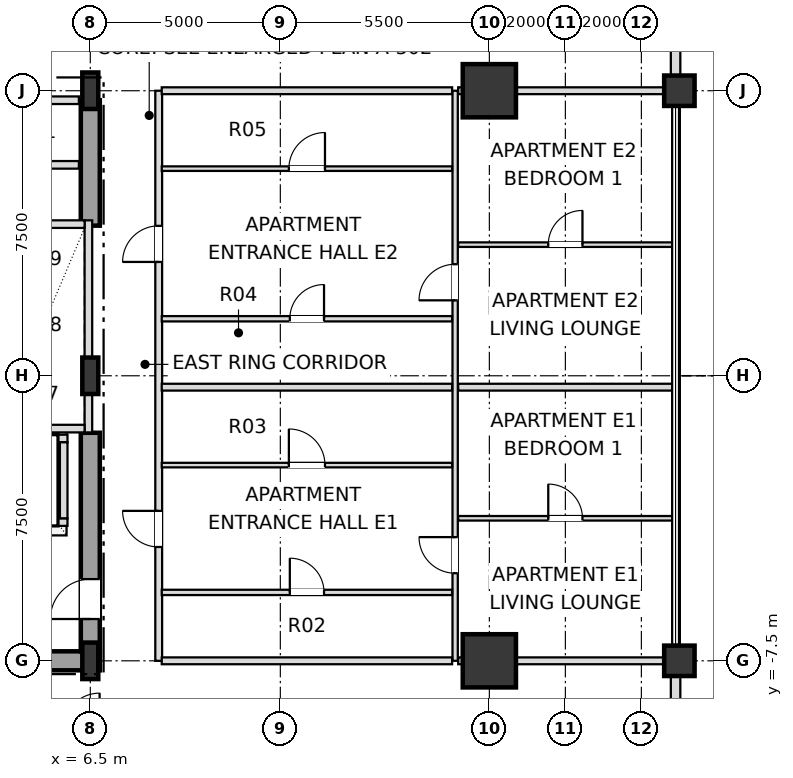
"""IFC4 building model, lengths in metres.
Left out: names, types, materials, properties, quantities, classifications, styles, units other than length and angle.
Written with IfcOpenShell. Run it as: python <this file> out.ifc"""

import sys

from ifc_helpers import new_model, si_unit, direction, frame, frame_2d, origin, origin_2d, place, context, subcontext, project, spatial, rectangle, i_section, extrude, element, fill, save


model = new_model("IFC4")
c1 = context("Model", 3, precision=1e-05, world=origin(), true_north=direction((0.0, 1.0)))
c2 = subcontext(c1, "Body", "Model", "MODEL_VIEW")
j1 = project(units=[si_unit("LENGTHUNIT", "METRE"), si_unit("PLANEANGLEUNIT", "RADIAN")], contexts=[c1])
p1 = place(None, origin())
s1 = spatial("IfcSite", under=j1, at=p1, CompositionType="ELEMENT")
p2 = place(p1, origin())
s2 = spatial("IfcBuilding", under=s1, at=p2, CompositionType="ELEMENT")
p3 = place(p2, frame((0.0, 0.0, 27.6)))
s3 = spatial("IfcBuildingStorey", under=s2, at=p3, CompositionType="ELEMENT", Elevation=27.6)
for number, where, z_axis, x_axis in (
    (1, (6.5, -7.5, 0.0), (0.0, 0.0, 1.0), (1.0, 0.0, 0.0)),
    (2, (6.5, 0.0, 0.0), (0.0, 0.0, 1.0), (1.0, 0.0, 0.0)),
    (3, (6.5, 7.5, 0.0), (0.0, 0.0, 1.0), (1.0, 0.0, 0.0)),
):
    element("IfcColumn", number, at=place(p3, frame(where, z_axis=z_axis, x_axis=x_axis)), inside=s3, PredefinedType="COLUMN", context=c2, shape_type="SweptSolid", body=[
        extrude(i_section(OverallWidth=0.42, OverallDepth=0.96, WebThickness=0.022, FlangeThickness=0.034, at=origin_2d()), origin(), (0.0, 0.0, 1.0), 4.8),
    ])
for number, where, z_axis, x_axis in (
    (4, (17.0, -7.5, 0.0), (0.0, 0.0, 1.0), (1.0, 0.0, 0.0)),
    (5, (17.0, 7.5, 0.0), (0.0, 0.0, 1.0), (1.0, 0.0, 0.0)),
):
    element("IfcColumn", number, at=place(p3, frame(where, z_axis=z_axis, x_axis=x_axis)), inside=s3, PredefinedType="USERDEFINED", context=c2, shape_type="SweptSolid", body=[
        extrude(rectangle(XDim=1.4, YDim=1.4, at=origin_2d()), origin(), (0.0, 0.0, 1.0), 4.8),
    ])
for number, where, z_axis, x_axis in (
    (6, (22.0, -7.5, 0.0), (0.0, 0.0, 1.0), (1.0, 0.0, 0.0)),
    (7, (22.0, 7.5, 0.0), (0.0, 0.0, 1.0), (1.0, 0.0, 0.0)),
):
    element("IfcColumn", number, at=place(p3, frame(where, z_axis=z_axis, x_axis=x_axis)), inside=s3, PredefinedType="COLUMN", context=c2, shape_type="SweptSolid", body=[
        extrude(rectangle(XDim=0.8, YDim=0.8, at=origin_2d()), origin(), (0.0, 0.0, 1.0), 4.8),
    ])
p4 = place(p3, frame((21.9, -12.605, 0.0), z_axis=(0.0, 0.0, 1.0), x_axis=(0.0, 1.0, 0.0)))
e8 = element("IfcWall", 8, at=p4, inside=s3, PredefinedType="SOLIDWALL", context=c2, shape_type="SweptSolid", body=[
    extrude(rectangle(XDim=4.71, YDim=0.25, at=frame_2d((2.355, 0.0))), origin(), (0.0, 0.0, 1.0), 3.936),
])
p5 = place(p4, frame((1.455, 0.0, 0.72)))
e9 = element("IfcOpeningElement", 9, at=p5, cuts=e8, PredefinedType="OPENING", context=c2, shape_type="SweptSolid", body=[
    extrude(rectangle(XDim=1.8, YDim=1.68, at=frame_2d((0.9, 0.84))), frame((0.0, 0.135, 0.0), z_axis=(0.0, -1.0, 0.0), x_axis=(1.0, 0.0, 0.0)), (0.0, 0.0, 1.0), 0.27),
])
p6 = place(p3, frame((21.9, 7.895, 0.0), z_axis=(0.0, 0.0, 1.0), x_axis=(0.0, 1.0, 0.0)))
e10 = element("IfcWall", 10, at=p6, inside=s3, PredefinedType="SOLIDWALL", context=c2, shape_type="SweptSolid", body=[
    extrude(rectangle(XDim=4.71, YDim=0.25, at=frame_2d((2.355, 0.0))), origin(), (0.0, 0.0, 1.0), 3.936),
])
p7 = place(p6, frame((1.455, 0.0, 0.72)))
e11 = element("IfcOpeningElement", 11, at=p7, cuts=e10, PredefinedType="OPENING", context=c2, shape_type="SweptSolid", body=[
    extrude(rectangle(XDim=1.8, YDim=1.68, at=frame_2d((0.9, 0.84))), frame((0.0, 0.135, 0.0), z_axis=(0.0, -1.0, 0.0), x_axis=(1.0, 0.0, 0.0)), (0.0, 0.0, 1.0), 0.27),
])
p8 = place(p3, frame((0.0, -7.5, 0.0), z_axis=(0.0, 0.0, 1.0), x_axis=(1.0, 0.0, 0.0)))
e12 = element("IfcWall", 12, at=p8, inside=s3, PredefinedType="SHEAR", context=c2, shape_type="SweptSolid", body=[
    extrude(rectangle(XDim=6.75, YDim=0.5, at=frame_2d((3.375, 0.0))), origin(), (0.0, 0.0, 1.0), 4.58),
])
p9 = place(p3, frame((6.5, -7.25, 0.0), z_axis=(0.0, 0.0, 1.0), x_axis=(0.0, 1.0, 0.0)))
e13 = element("IfcWall", 13, at=p9, inside=s3, PredefinedType="SHEAR", context=c2, shape_type="SweptSolid", body=[
    extrude(rectangle(XDim=5.75, YDim=0.5, at=frame_2d((2.875, 0.0))), origin(), (0.0, 0.0, 1.0), 4.58),
])
p10 = place(p9, frame((0.85, 0.0, 0.0)))
e14 = element("IfcOpeningElement", 14, at=p10, cuts=e13, PredefinedType="OPENING", context=c2, shape_type="SweptSolid", body=[
    extrude(rectangle(XDim=1.05, YDim=2.15, at=frame_2d((0.525, 1.075))), frame((0.0, 0.26, 0.0), z_axis=(0.0, -1.0, 0.0), x_axis=(1.0, 0.0, 0.0)), (0.0, 0.0, 1.0), 0.52),
])
p11 = place(p3, frame((6.5, 3.95, 0.0), z_axis=(0.0, 0.0, 1.0), x_axis=(0.0, 1.0, 0.0)))
e15 = element("IfcWall", 15, at=p11, inside=s3, PredefinedType="SHEAR", context=c2, shape_type="SweptSolid", body=[
    extrude(rectangle(XDim=3.3, YDim=0.5, at=frame_2d((1.65, 0.0))), origin(), (0.0, 0.0, 1.0), 4.58),
])
p12 = place(p3, frame((6.45, -1.49, 0.0), z_axis=(0.0, 0.0, 1.0), x_axis=(0.0, 1.0, 0.0)))
e16 = element("IfcWall", 16, at=p12, inside=s3, PredefinedType="SOLIDWALL", context=c2, shape_type="SweptSolid", body=[
    extrude(rectangle(XDim=5.58, YDim=0.2, at=frame_2d((2.79, 0.0))), origin(), (0.0, 0.0, 1.0), 4.016),
])
for number, where, z_axis, x_axis in (
    (17, (4.15, -1.39, 0.0), (0.0, 0.0, 1.0), (1.0, 0.0, 0.0)),
    (18, (4.15, 3.99, 0.0), (0.0, 0.0, 1.0), (1.0, 0.0, 0.0)),
):
    element("IfcWall", number, at=place(p3, frame(where, z_axis=z_axis, x_axis=x_axis)), inside=s3, PredefinedType="SOLIDWALL", context=c2, shape_type="SweptSolid", body=[
        extrude(rectangle(XDim=2.2, YDim=0.2, at=frame_2d((1.1, 0.0))), origin(), (0.0, 0.0, 1.0), 4.58),
    ])
p13 = place(p3, frame((1.8, -3.85, 0.0), z_axis=(0.0, 0.0, 1.0), x_axis=(1.0, 0.0, 0.0)))
e19 = element("IfcWall", 19, at=p13, inside=s3, PredefinedType="SOLIDWALL", context=c2, shape_type="SweptSolid", body=[
    extrude(rectangle(XDim=4.1, YDim=0.2, at=frame_2d((2.05, 0.0))), origin(), (0.0, 0.0, 1.0), 4.58),
])
p14 = place(p13, frame((0.45, 0.0, 0.0)))
e20 = element("IfcOpeningElement", 20, at=p14, cuts=e19, PredefinedType="OPENING", context=c2, shape_type="SweptSolid", body=[
    extrude(rectangle(XDim=1.2, YDim=2.2, at=frame_2d((0.6, 1.1))), frame((0.0, 0.11, 0.0), z_axis=(0.0, -1.0, 0.0), x_axis=(1.0, 0.0, 0.0)), (0.0, 0.0, 1.0), 0.22),
])
p15 = place(p13, frame((2.45, 0.0, 0.0)))
e21 = element("IfcOpeningElement", 21, at=p15, cuts=e19, PredefinedType="OPENING", context=c2, shape_type="SweptSolid", body=[
    extrude(rectangle(XDim=1.2, YDim=2.2, at=frame_2d((0.6, 1.1))), frame((0.0, 0.11, 0.0), z_axis=(0.0, -1.0, 0.0), x_axis=(1.0, 0.0, 0.0)), (0.0, 0.0, 1.0), 0.22),
])
p16 = place(p3, frame((1.8, -1.65, 0.0), z_axis=(0.0, 0.0, 1.0), x_axis=(1.0, 0.0, 0.0)))
e22 = element("IfcWall", 22, at=p16, inside=s3, PredefinedType="SOLIDWALL", context=c2, shape_type="SweptSolid", body=[
    extrude(rectangle(XDim=4.1, YDim=0.2, at=frame_2d((2.05, 0.0))), origin(), (0.0, 0.0, 1.0), 4.58),
])
p17 = place(p3, frame((5.8, -3.75, 0.0), z_axis=(0.0, 0.0, 1.0), x_axis=(0.0, 1.0, 0.0)))
e23 = element("IfcWall", 23, at=p17, inside=s3, PredefinedType="SOLIDWALL", context=c2, shape_type="SweptSolid", body=[
    extrude(rectangle(XDim=2.0, YDim=0.2, at=frame_2d((1.0, 0.0))), origin(), (0.0, 0.0, 1.0), 4.58),
])
p18 = place(p3, frame((8.3, -7.5, 0.0), z_axis=(0.0, 0.0, 1.0), x_axis=(0.0, 1.0, 0.0)))
e24 = element("IfcWall", 24, at=p18, inside=s3, PredefinedType="PARTITIONING", context=c2, shape_type="SweptSolid", body=[
    extrude(rectangle(XDim=15.0, YDim=0.18, at=frame_2d((7.5, 0.0))), origin(), (0.0, 0.0, 1.0), 4.58),
])
p19 = place(p18, frame((2.995, 0.0, 0.0)))
e25 = element("IfcOpeningElement", 25, at=p19, cuts=e24, PredefinedType="OPENING", context=c2, shape_type="SweptSolid", body=[
    extrude(rectangle(XDim=0.95, YDim=2.15, at=frame_2d((0.475, 1.075))), frame((0.0, 0.1, 0.0), z_axis=(0.0, -1.0, 0.0), x_axis=(1.0, 0.0, 0.0)), (0.0, 0.0, 1.0), 0.2),
])
p20 = place(p18, frame((10.495, 0.0, 0.0)))
e26 = element("IfcOpeningElement", 26, at=p20, cuts=e24, PredefinedType="OPENING", context=c2, shape_type="SweptSolid", body=[
    extrude(rectangle(XDim=0.95, YDim=2.15, at=frame_2d((0.475, 1.075))), frame((0.0, 0.1, 0.0), z_axis=(0.0, -1.0, 0.0), x_axis=(1.0, 0.0, 0.0)), (0.0, 0.0, 1.0), 0.2),
])
p21 = place(p3, frame((16.1, -7.5, 0.0), z_axis=(0.0, 0.0, 1.0), x_axis=(0.0, 1.0, 0.0)))
e27 = element("IfcWall", 27, at=p21, inside=s3, PredefinedType="PARTITIONING", context=c2, shape_type="SweptSolid", body=[
    extrude(rectangle(XDim=15.0, YDim=0.14, at=frame_2d((7.5, 0.0))), origin(), (0.0, 0.0, 1.0), 4.58),
])
p22 = place(p21, frame((2.305, 0.0, 0.0)))
e28 = element("IfcOpeningElement", 28, at=p22, cuts=e27, PredefinedType="OPENING", context=c2, shape_type="SweptSolid", body=[
    extrude(rectangle(XDim=0.95, YDim=2.1, at=frame_2d((0.475, 1.05))), frame((0.0, 0.08, 0.0), z_axis=(0.0, -1.0, 0.0), x_axis=(1.0, 0.0, 0.0)), (0.0, 0.0, 1.0), 0.16),
])
p23 = place(p21, frame((9.485, 0.0, 0.0)))
e29 = element("IfcOpeningElement", 29, at=p23, cuts=e27, PredefinedType="OPENING", context=c2, shape_type="SweptSolid", body=[
    extrude(rectangle(XDim=0.95, YDim=2.1, at=frame_2d((0.475, 1.05))), frame((0.0, 0.08, 0.0), z_axis=(0.0, -1.0, 0.0), x_axis=(1.0, 0.0, 0.0)), (0.0, 0.0, 1.0), 0.16),
])
p24 = place(p3, frame((8.38, -7.5, 0.0), z_axis=(0.0, 0.0, 1.0), x_axis=(1.0, 0.0, 0.0)))
e30 = element("IfcWall", 30, at=p24, inside=s3, PredefinedType="PARTITIONING", context=c2, shape_type="SweptSolid", body=[
    extrude(rectangle(XDim=7.64, YDim=0.18, at=frame_2d((3.82, 0.0))), origin(), (0.0, 0.0, 1.0), 4.016),
])
p25 = place(p3, frame((16.18, -7.5, 0.0), z_axis=(0.0, 0.0, 1.0), x_axis=(1.0, 0.0, 0.0)))
e31 = element("IfcWall", 31, at=p25, inside=s3, PredefinedType="PARTITIONING", context=c2, shape_type="SweptSolid", body=[
    extrude(rectangle(XDim=5.72, YDim=0.18, at=frame_2d((2.86, 0.0))), origin(), (0.0, 0.0, 1.0), 4.016),
])
p26 = place(p3, frame((8.38, -5.7, 0.0), z_axis=(0.0, 0.0, 1.0), x_axis=(1.0, 0.0, 0.0)))
e32 = element("IfcWall", 32, at=p26, inside=s3, PredefinedType="PARTITIONING", context=c2, shape_type="SweptSolid", body=[
    extrude(rectangle(XDim=7.64, YDim=0.14, at=frame_2d((3.82, 0.0))), origin(), (0.0, 0.0, 1.0), 4.148),
])
p27 = place(p26, frame((3.37, 0.0, 0.0)))
e33 = element("IfcOpeningElement", 33, at=p27, cuts=e32, PredefinedType="OPENING", context=c2, shape_type="SweptSolid", body=[
    extrude(rectangle(XDim=0.9, YDim=2.1, at=frame_2d((0.45, 1.05))), frame((0.0, 0.08, 0.0), z_axis=(0.0, -1.0, 0.0), x_axis=(1.0, 0.0, 0.0)), (0.0, 0.0, 1.0), 0.16),
])
p28 = place(p3, frame((16.18, -3.75, 0.0), z_axis=(0.0, 0.0, 1.0), x_axis=(1.0, 0.0, 0.0)))
e34 = element("IfcWall", 34, at=p28, inside=s3, PredefinedType="PARTITIONING", context=c2, shape_type="SweptSolid", body=[
    extrude(rectangle(XDim=5.64, YDim=0.12, at=frame_2d((2.82, 0.0))), origin(), (0.0, 0.0, 1.0), 4.016),
])
p29 = place(p28, frame((2.37, 0.0, 0.0)))
e35 = element("IfcOpeningElement", 35, at=p29, cuts=e34, PredefinedType="OPENING", context=c2, shape_type="SweptSolid", body=[
    extrude(rectangle(XDim=0.9, YDim=2.1, at=frame_2d((0.45, 1.05))), frame((0.0, 0.07, 0.0), z_axis=(0.0, -1.0, 0.0), x_axis=(1.0, 0.0, 0.0)), (0.0, 0.0, 1.0), 0.14),
])
p30 = place(p3, frame((8.38, -2.35, 0.0), z_axis=(0.0, 0.0, 1.0), x_axis=(1.0, 0.0, 0.0)))
e36 = element("IfcWall", 36, at=p30, inside=s3, PredefinedType="PARTITIONING", context=c2, shape_type="SweptSolid", body=[
    extrude(rectangle(XDim=7.64, YDim=0.12, at=frame_2d((3.82, 0.0))), origin(), (0.0, 0.0, 1.0), 4.148),
])
p31 = place(p30, frame((3.345, 0.0, 0.0)))
e37 = element("IfcOpeningElement", 37, at=p31, cuts=e36, PredefinedType="OPENING", context=c2, shape_type="SweptSolid", body=[
    extrude(rectangle(XDim=0.95, YDim=2.1, at=frame_2d((0.475, 1.05))), frame((0.0, 0.07, 0.0), z_axis=(0.0, -1.0, 0.0), x_axis=(1.0, 0.0, 0.0)), (0.0, 0.0, 1.0), 0.14),
])
p32 = place(p3, frame((8.38, -0.3, 0.0), z_axis=(0.0, 0.0, 1.0), x_axis=(1.0, 0.0, 0.0)))
e38 = element("IfcWall", 38, at=p32, inside=s3, PredefinedType="PARTITIONING", context=c2, shape_type="SweptSolid", body=[
    extrude(rectangle(XDim=7.64, YDim=0.18, at=frame_2d((3.82, 0.0))), origin(), (0.0, 0.0, 1.0), 4.148),
])
p33 = place(p3, frame((16.18, -0.3, 0.0), z_axis=(0.0, 0.0, 1.0), x_axis=(1.0, 0.0, 0.0)))
e39 = element("IfcWall", 39, at=p33, inside=s3, PredefinedType="PARTITIONING", context=c2, shape_type="SweptSolid", body=[
    extrude(rectangle(XDim=5.64, YDim=0.18, at=frame_2d((2.82, 0.0))), origin(), (0.0, 0.0, 1.0), 4.016),
])
p34 = place(p3, frame((8.38, 1.5, 0.0), z_axis=(0.0, 0.0, 1.0), x_axis=(1.0, 0.0, 0.0)))
e40 = element("IfcWall", 40, at=p34, inside=s3, PredefinedType="PARTITIONING", context=c2, shape_type="SweptSolid", body=[
    extrude(rectangle(XDim=7.64, YDim=0.14, at=frame_2d((3.82, 0.0))), origin(), (0.0, 0.0, 1.0), 4.148),
])
p35 = place(p34, frame((3.37, 0.0, 0.0)))
e41 = element("IfcOpeningElement", 41, at=p35, cuts=e40, PredefinedType="OPENING", context=c2, shape_type="SweptSolid", body=[
    extrude(rectangle(XDim=0.9, YDim=2.1, at=frame_2d((0.45, 1.05))), frame((0.0, 0.08, 0.0), z_axis=(0.0, -1.0, 0.0), x_axis=(1.0, 0.0, 0.0)), (0.0, 0.0, 1.0), 0.16),
])
p36 = place(p3, frame((16.18, 3.45, 0.0), z_axis=(0.0, 0.0, 1.0), x_axis=(1.0, 0.0, 0.0)))
e42 = element("IfcWall", 42, at=p36, inside=s3, PredefinedType="PARTITIONING", context=c2, shape_type="SweptSolid", body=[
    extrude(rectangle(XDim=5.64, YDim=0.12, at=frame_2d((2.82, 0.0))), origin(), (0.0, 0.0, 1.0), 4.016),
])
p37 = place(p36, frame((2.37, 0.0, 0.0)))
e43 = element("IfcOpeningElement", 43, at=p37, cuts=e42, PredefinedType="OPENING", context=c2, shape_type="SweptSolid", body=[
    extrude(rectangle(XDim=0.9, YDim=2.1, at=frame_2d((0.45, 1.05))), frame((0.0, 0.07, 0.0), z_axis=(0.0, -1.0, 0.0), x_axis=(1.0, 0.0, 0.0)), (0.0, 0.0, 1.0), 0.14),
])
p38 = place(p3, frame((8.38, 5.45, 0.0), z_axis=(0.0, 0.0, 1.0), x_axis=(1.0, 0.0, 0.0)))
e44 = element("IfcWall", 44, at=p38, inside=s3, PredefinedType="PARTITIONING", context=c2, shape_type="SweptSolid", body=[
    extrude(rectangle(XDim=7.64, YDim=0.12, at=frame_2d((3.82, 0.0))), origin(), (0.0, 0.0, 1.0), 4.148),
])
p39 = place(p38, frame((3.345, 0.0, 0.0)))
e45 = element("IfcOpeningElement", 45, at=p39, cuts=e44, PredefinedType="OPENING", context=c2, shape_type="SweptSolid", body=[
    extrude(rectangle(XDim=0.95, YDim=2.1, at=frame_2d((0.475, 1.05))), frame((0.0, 0.07, 0.0), z_axis=(0.0, -1.0, 0.0), x_axis=(1.0, 0.0, 0.0)), (0.0, 0.0, 1.0), 0.14),
])
for number, where, z_axis, x_axis in (
    (46, (4.13, 5.55, 0.0), (0.0, 0.0, 1.0), (1.0, 0.0, 0.0)),
    (47, (4.13, 7.25, 0.0), (0.0, 0.0, 1.0), (1.0, 0.0, 0.0)),
):
    element("IfcWall", number, at=place(p3, frame(where, z_axis=z_axis, x_axis=x_axis)), inside=s3, PredefinedType="SOLIDWALL", context=c2, shape_type="SweptSolid", body=[
        extrude(rectangle(XDim=2.07, YDim=0.2, at=frame_2d((1.035, 0.0))), origin(), (0.0, 0.0, 1.0), 4.58),
    ])
p40 = place(p3, frame((8.38, 7.5, 0.0), z_axis=(0.0, 0.0, 1.0), x_axis=(1.0, 0.0, 0.0)))
e48 = element("IfcWall", 48, at=p40, inside=s3, PredefinedType="PARTITIONING", context=c2, shape_type="SweptSolid", body=[
    extrude(rectangle(XDim=7.64, YDim=0.18, at=frame_2d((3.82, 0.0))), origin(), (0.0, 0.0, 1.0), 4.016),
])
p41 = place(p3, frame((16.18, 7.5, 0.0), z_axis=(0.0, 0.0, 1.0), x_axis=(1.0, 0.0, 0.0)))
e49 = element("IfcWall", 49, at=p41, inside=s3, PredefinedType="PARTITIONING", context=c2, shape_type="SweptSolid", body=[
    extrude(rectangle(XDim=5.72, YDim=0.18, at=frame_2d((2.86, 0.0))), origin(), (0.0, 0.0, 1.0), 4.016),
])
p42 = place(p10, origin())
e50 = element("IfcDoor", 50, at=p42, inside=s3, OperationType="SINGLE_SWING_LEFT", PredefinedType="DOOR", context=c2, shape_type="SweptSolid", body=[
    extrude(rectangle(XDim=1.05, YDim=2.15, at=frame_2d((0.525, 1.075))), frame((0.0, 0.025, 0.0), z_axis=(0.0, -1.0, 0.0), x_axis=(1.0, 0.0, 0.0)), (0.0, 0.0, 1.0), 0.05),
])
fill(e14, e50)
p43 = place(p27, origin())
e51 = element("IfcDoor", 51, at=p43, inside=s3, OperationType="SINGLE_SWING_LEFT", PredefinedType="DOOR", context=c2, shape_type="SweptSolid", body=[
    extrude(rectangle(XDim=0.9, YDim=2.1, at=frame_2d((0.45, 1.05))), frame((0.0, 0.025, 0.0), z_axis=(0.0, -1.0, 0.0), x_axis=(1.0, 0.0, 0.0)), (0.0, 0.0, 1.0), 0.05),
])
fill(e33, e51)
p44 = place(p19, origin())
e52 = element("IfcDoor", 52, at=p44, inside=s3, OperationType="SINGLE_SWING_RIGHT", PredefinedType="DOOR", context=c2, shape_type="SweptSolid", body=[
    extrude(rectangle(XDim=0.95, YDim=2.15, at=frame_2d((0.475, 1.075))), frame((0.0, 0.025, 0.0), z_axis=(0.0, -1.0, 0.0), x_axis=(1.0, 0.0, 0.0)), (0.0, 0.0, 1.0), 0.05),
])
fill(e25, e52)
p45 = place(p31, origin())
e53 = element("IfcDoor", 53, at=p45, inside=s3, OperationType="SINGLE_SWING_LEFT", PredefinedType="DOOR", context=c2, shape_type="SweptSolid", body=[
    extrude(rectangle(XDim=0.95, YDim=2.1, at=frame_2d((0.475, 1.05))), frame((0.0, 0.025, 0.0), z_axis=(0.0, -1.0, 0.0), x_axis=(1.0, 0.0, 0.0)), (0.0, 0.0, 1.0), 0.05),
])
fill(e37, e53)
p46 = place(p22, origin())
e54 = element("IfcDoor", 54, at=p46, inside=s3, OperationType="SINGLE_SWING_RIGHT", PredefinedType="DOOR", context=c2, shape_type="SweptSolid", body=[
    extrude(rectangle(XDim=0.95, YDim=2.1, at=frame_2d((0.475, 1.05))), frame((0.0, 0.025, 0.0), z_axis=(0.0, -1.0, 0.0), x_axis=(1.0, 0.0, 0.0)), (0.0, 0.0, 1.0), 0.05),
])
fill(e28, e54)
p47 = place(p29, origin())
e55 = element("IfcDoor", 55, at=p47, inside=s3, OperationType="SINGLE_SWING_LEFT", PredefinedType="DOOR", context=c2, shape_type="SweptSolid", body=[
    extrude(rectangle(XDim=0.9, YDim=2.1, at=frame_2d((0.45, 1.05))), frame((0.0, 0.025, 0.0), z_axis=(0.0, -1.0, 0.0), x_axis=(1.0, 0.0, 0.0)), (0.0, 0.0, 1.0), 0.05),
])
fill(e35, e55)
p48 = place(p35, origin())
e56 = element("IfcDoor", 56, at=p48, inside=s3, OperationType="SINGLE_SWING_RIGHT", PredefinedType="DOOR", context=c2, shape_type="SweptSolid", body=[
    extrude(rectangle(XDim=0.9, YDim=2.1, at=frame_2d((0.45, 1.05))), frame((0.0, 0.025, 0.0), z_axis=(0.0, -1.0, 0.0), x_axis=(1.0, 0.0, 0.0)), (0.0, 0.0, 1.0), 0.05),
])
fill(e41, e56)
p49 = place(p20, origin())
e57 = element("IfcDoor", 57, at=p49, inside=s3, OperationType="SINGLE_SWING_LEFT", PredefinedType="DOOR", context=c2, shape_type="SweptSolid", body=[
    extrude(rectangle(XDim=0.95, YDim=2.15, at=frame_2d((0.475, 1.075))), frame((0.0, 0.025, 0.0), z_axis=(0.0, -1.0, 0.0), x_axis=(1.0, 0.0, 0.0)), (0.0, 0.0, 1.0), 0.05),
])
fill(e26, e57)
p50 = place(p39, origin())
e58 = element("IfcDoor", 58, at=p50, inside=s3, OperationType="SINGLE_SWING_RIGHT", PredefinedType="DOOR", context=c2, shape_type="SweptSolid", body=[
    extrude(rectangle(XDim=0.95, YDim=2.1, at=frame_2d((0.475, 1.05))), frame((0.0, 0.025, 0.0), z_axis=(0.0, -1.0, 0.0), x_axis=(1.0, 0.0, 0.0)), (0.0, 0.0, 1.0), 0.05),
])
fill(e45, e58)
p51 = place(p23, origin())
e59 = element("IfcDoor", 59, at=p51, inside=s3, OperationType="SINGLE_SWING_LEFT", PredefinedType="DOOR", context=c2, shape_type="SweptSolid", body=[
    extrude(rectangle(XDim=0.95, YDim=2.1, at=frame_2d((0.475, 1.05))), frame((0.0, 0.025, 0.0), z_axis=(0.0, -1.0, 0.0), x_axis=(1.0, 0.0, 0.0)), (0.0, 0.0, 1.0), 0.05),
])
fill(e29, e59)
p52 = place(p37, origin())
e60 = element("IfcDoor", 60, at=p52, inside=s3, OperationType="SINGLE_SWING_RIGHT", PredefinedType="DOOR", context=c2, shape_type="SweptSolid", body=[
    extrude(rectangle(XDim=0.9, YDim=2.1, at=frame_2d((0.45, 1.05))), frame((0.0, 0.025, 0.0), z_axis=(0.0, -1.0, 0.0), x_axis=(1.0, 0.0, 0.0)), (0.0, 0.0, 1.0), 0.05),
])
fill(e43, e60)
save(model, sys.argv[1])
